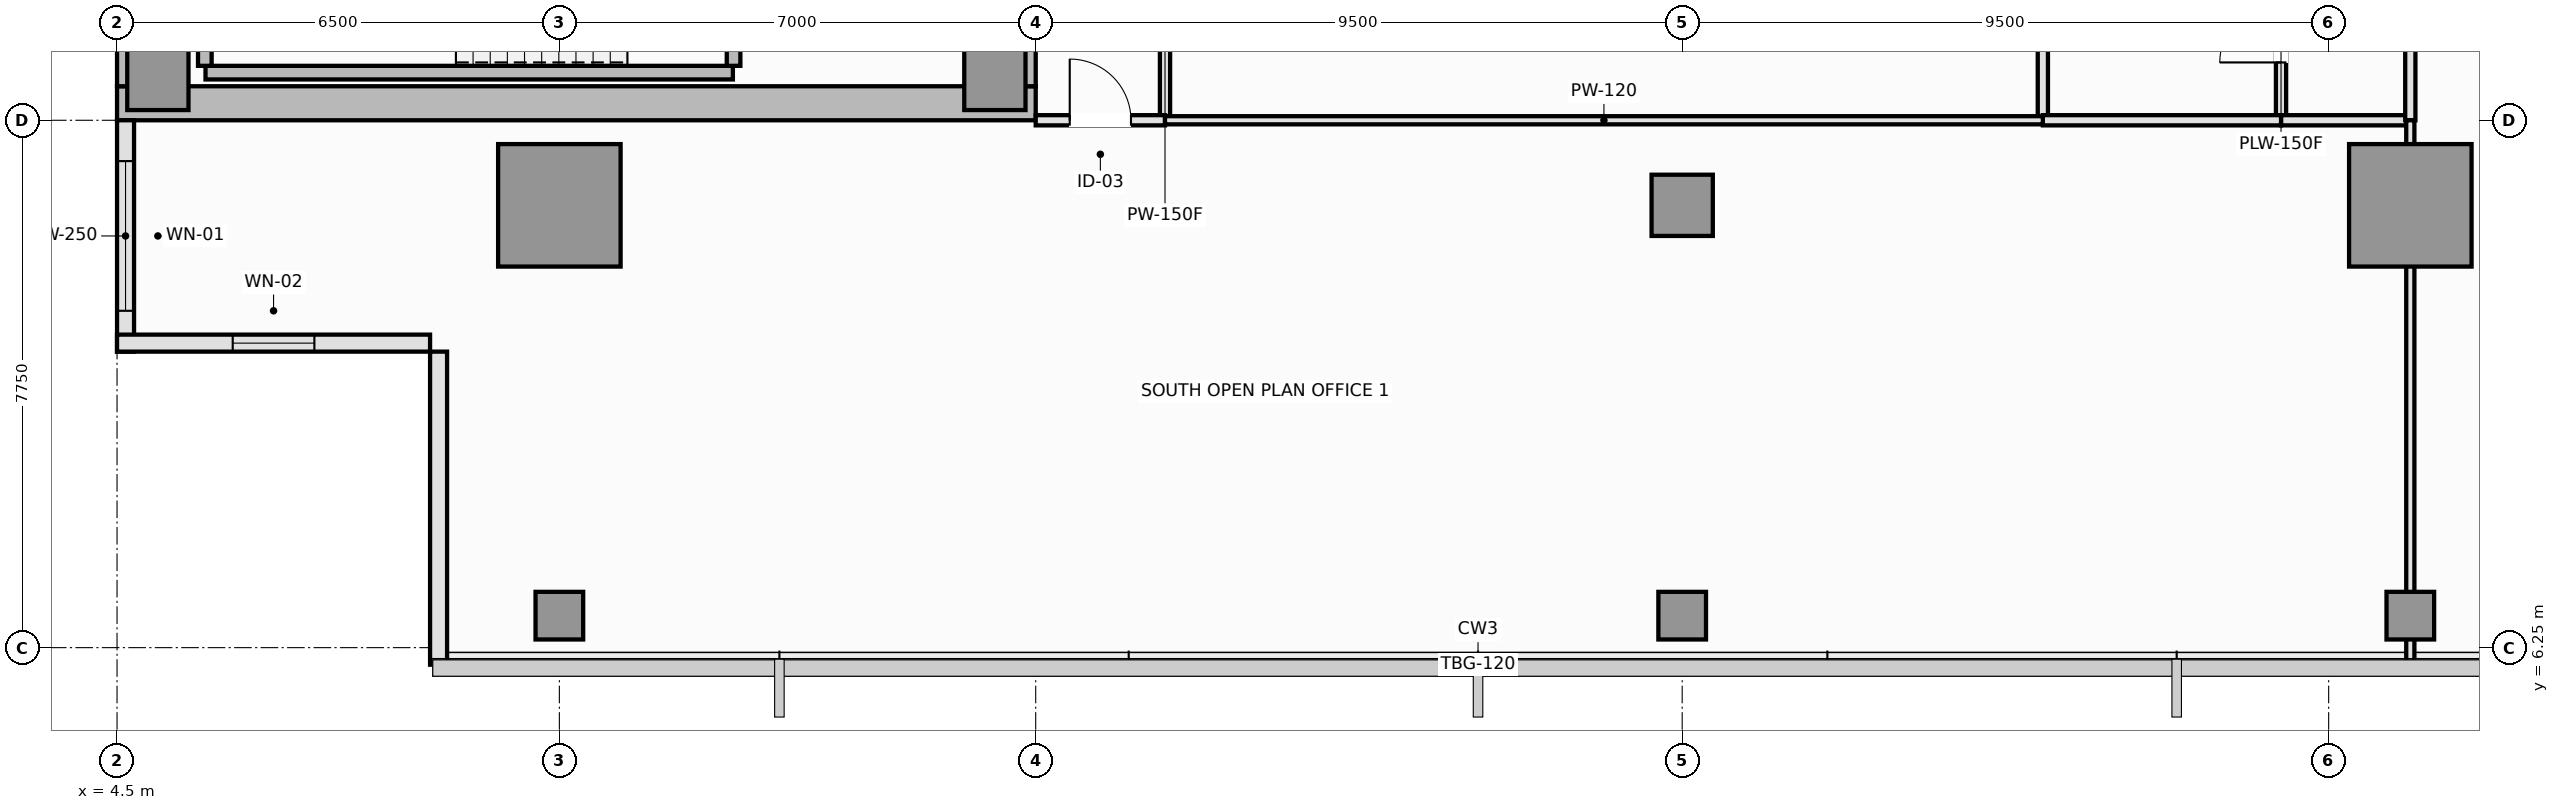
"""IFC4 building model, lengths in metres.
Left out: names, types, materials, properties, quantities, classifications, styles, units other than length and angle.
Written with IfcOpenShell. Run it as: python <this file> out.ifc"""

import sys

from ifc_helpers import new_model, si_unit, direction, frame, frame_2d, origin, origin_2d, place, context, subcontext, project, spatial, rectangle, extrude, element, fill, save


model = new_model("IFC4")
c1 = context("Model", 3, precision=1e-05, world=origin(), true_north=direction((0.0, 1.0)))
c2 = subcontext(c1, "Body", "Model", "MODEL_VIEW")
j1 = project(units=[si_unit("LENGTHUNIT", "METRE"), si_unit("PLANEANGLEUNIT", "RADIAN")], contexts=[c1])
p1 = place(None, origin())
s1 = spatial("IfcSite", under=j1, at=p1, CompositionType="ELEMENT")
p2 = place(p1, origin())
s2 = spatial("IfcBuilding", under=s1, at=p2, CompositionType="ELEMENT")
p3 = place(p2, frame((0.0, 0.0, 249.25)))
s3 = spatial("IfcBuildingStorey", under=s2, at=p3, CompositionType="ELEMENT", Elevation=249.25)
p4 = place(p3, frame((4.5, 14.25, 0.0), z_axis=(0.0, 0.0, 1.0), x_axis=(1.0, 0.0, 0.0)))
e1 = element("IfcWall", 1, at=p4, inside=s3, PredefinedType="SHEAR", context=c2, shape_type="SweptSolid", body=[
    extrude(rectangle(XDim=13.5, YDim=0.5, at=frame_2d((6.75, 0.0))), origin(), (0.0, 0.0, 1.0), 3.55),
])
p5 = place(p3, frame((4.75, 14.5, 0.0), z_axis=(0.0, 0.0, 1.0), x_axis=(0.0, 1.0, 0.0)))
e2 = element("IfcWall", 2, at=p5, inside=s3, PredefinedType="SHEAR", context=c2, shape_type="SweptSolid", body=[
    extrude(rectangle(XDim=21.5, YDim=0.5, at=frame_2d((10.75, 0.0))), origin(), (0.0, 0.0, 1.0), 3.55),
])
p6 = place(p3, frame((17.75, 14.5, 0.0), z_axis=(0.0, 0.0, 1.0), x_axis=(0.0, 1.0, 0.0)))
e3 = element("IfcWall", 3, at=p6, inside=s3, PredefinedType="SHEAR", context=c2, shape_type="SweptSolid", body=[
    extrude(rectangle(XDim=8.95, YDim=0.5, at=frame_2d((4.475, 0.0))), origin(), (0.0, 0.0, 1.0), 3.55),
])
p7 = place(p6, frame((4.4, 0.0, 0.0)))
e4 = element("IfcOpeningElement", 4, at=p7, cuts=e3, PredefinedType="OPENING", context=c2, shape_type="SweptSolid", body=[
    extrude(rectangle(XDim=1.1, YDim=2.15, at=frame_2d((0.55, 1.075))), frame((0.0, 0.26, 0.0), z_axis=(0.0, -1.0, 0.0), x_axis=(1.0, 0.0, 0.0)), (0.0, 0.0, 1.0), 0.52),
])
for number, where, z_axis, x_axis in (
    (5, (5.1, 14.6, 0.0), (0.0, 0.0, 1.0), (1.0, 0.0, 0.0)),
    (6, (17.4, 14.6, 0.0), (0.0, 0.0, 1.0), (1.0, 0.0, 0.0)),
):
    element("IfcColumn", number, at=place(p3, frame(where, z_axis=z_axis, x_axis=x_axis)), inside=s3, PredefinedType="PILASTER", context=c2, shape_type="SweptSolid", body=[
        extrude(rectangle(XDim=0.9, YDim=0.9, at=origin_2d()), origin(), (0.0, 0.0, 1.0), 3.55),
    ])
for number, where, z_axis, x_axis in (
    (7, (11.0, 12.75, 0.0), (0.0, 0.0, 1.0), (1.0, 0.0, 0.0)),
    (8, (38.2, 12.75, 0.0), (0.0, 0.0, 1.0), (1.0, 0.0, 0.0)),
):
    element("IfcColumn", number, at=place(p3, frame(where, z_axis=z_axis, x_axis=x_axis)), inside=s3, PredefinedType="COLUMN", context=c2, shape_type="SweptSolid", body=[
        extrude(rectangle(XDim=1.8, YDim=1.8, at=origin_2d()), origin(), (0.0, 0.0, 1.0), 3.55),
    ])
p8 = place(p3, frame((27.5, 12.75, 0.0), z_axis=(0.0, 0.0, 1.0), x_axis=(1.0, 0.0, 0.0)))
e9 = element("IfcColumn", 9, at=p8, inside=s3, PredefinedType="COLUMN", context=c2, shape_type="SweptSolid", body=[
    extrude(rectangle(XDim=0.9, YDim=0.9, at=origin_2d()), origin(), (0.0, 0.0, 1.0), 3.55),
])
for number, where, z_axis, x_axis in (
    (10, (11.0, 6.72, 0.0), (0.0, 0.0, 1.0), (1.0, 0.0, 0.0)),
    (11, (27.5, 6.72, 0.0), (0.0, 0.0, 1.0), (1.0, 0.0, 0.0)),
    (12, (38.2, 6.72, 0.0), (0.0, 0.0, 1.0), (1.0, 0.0, 0.0)),
):
    element("IfcColumn", number, at=place(p3, frame(where, z_axis=z_axis, x_axis=x_axis)), inside=s3, PredefinedType="COLUMN", context=c2, shape_type="SweptSolid", body=[
        extrude(rectangle(XDim=0.7, YDim=0.7, at=origin_2d()), origin(), (0.0, 0.0, 1.0), 3.55),
    ])
p9 = place(p3, frame((4.625, 14.0, 0.0), z_axis=(0.0, 0.0, 1.0), x_axis=(0.0, -1.0, 0.0)))
e13 = element("IfcWall", 13, at=p9, inside=s3, PredefinedType="SOLIDWALL", context=c2, shape_type="SweptSolid", body=[
    extrude(rectangle(XDim=3.4, YDim=0.25, at=frame_2d((1.7, 0.0))), origin(), (0.0, 0.0, 1.0), 3.39),
])
p10 = place(p9, frame((0.6, 0.0, 0.9)))
e14 = element("IfcOpeningElement", 14, at=p10, cuts=e13, PredefinedType="OPENING", context=c2, shape_type="SweptSolid", body=[
    extrude(rectangle(XDim=2.2, YDim=1.8, at=frame_2d((1.1, 0.9))), frame((0.0, 0.135, 0.0), z_axis=(0.0, -1.0, 0.0), x_axis=(1.0, 0.0, 0.0)), (0.0, 0.0, 1.0), 0.27),
])
p11 = place(p3, frame((4.5, 10.725, 0.0), z_axis=(0.0, 0.0, 1.0), x_axis=(1.0, 0.0, 0.0)))
e15 = element("IfcWall", 15, at=p11, inside=s3, PredefinedType="SOLIDWALL", context=c2, shape_type="SweptSolid", body=[
    extrude(rectangle(XDim=4.6, YDim=0.25, at=frame_2d((2.3, 0.0))), origin(), (0.0, 0.0, 1.0), 3.39),
])
p12 = place(p11, frame((1.7, 0.0, 0.9)))
e16 = element("IfcOpeningElement", 16, at=p12, cuts=e15, PredefinedType="OPENING", context=c2, shape_type="SweptSolid", body=[
    extrude(rectangle(XDim=1.2, YDim=1.8, at=frame_2d((0.6, 0.9))), frame((0.0, 0.135, 0.0), z_axis=(0.0, -1.0, 0.0), x_axis=(1.0, 0.0, 0.0)), (0.0, 0.0, 1.0), 0.27),
])
p13 = place(p3, frame((9.225, 10.6, 0.0), z_axis=(0.0, 0.0, 1.0), x_axis=(0.0, -1.0, 0.0)))
e17 = element("IfcWall", 17, at=p13, inside=s3, PredefinedType="SOLIDWALL", context=c2, shape_type="SweptSolid", body=[
    extrude(rectangle(XDim=4.6, YDim=0.25, at=frame_2d((2.3, 0.0))), origin(), (0.0, 0.0, 1.0), 3.39),
])
p14 = place(p3, frame((5.8, 14.7, 0.0), z_axis=(0.0, 0.0, 1.0), x_axis=(1.0, 0.0, 0.0)))
e18 = element("IfcWall", 18, at=p14, inside=s3, PredefinedType="SOLIDWALL", context=c2, shape_type="SweptSolid", body=[
    extrude(rectangle(XDim=7.75, YDim=0.2, at=frame_2d((3.875, 0.0))), origin(), (0.0, 0.0, 1.0), 3.55),
])
p15 = place(p3, frame((5.79, 14.8, 0.0), z_axis=(0.0, 0.0, 1.0), x_axis=(0.0, 1.0, 0.0)))
e19 = element("IfcWall", 19, at=p15, inside=s3, PredefinedType="SOLIDWALL", context=c2, shape_type="SweptSolid", body=[
    extrude(rectangle(XDim=3.05, YDim=0.2, at=frame_2d((1.525, 0.0))), origin(), (0.0, 0.0, 1.0), 3.55),
])
p16 = place(p3, frame((13.56, 14.8, 0.0), z_axis=(0.0, 0.0, 1.0), x_axis=(0.0, 1.0, 0.0)))
e20 = element("IfcWall", 20, at=p16, inside=s3, PredefinedType="SOLIDWALL", context=c2, shape_type="SweptSolid", body=[
    extrude(rectangle(XDim=3.05, YDim=0.2, at=frame_2d((1.525, 0.0))), origin(), (0.0, 0.0, 1.0), 3.55),
])
p17 = place(p16, frame((0.95, 0.0, 0.0)))
e21 = element("IfcOpeningElement", 21, at=p17, cuts=e20, PredefinedType="OPENING", context=c2, shape_type="SweptSolid", body=[
    extrude(rectangle(XDim=1.15, YDim=2.15, at=frame_2d((0.575, 1.075))), frame((0.0, 0.11, 0.0), z_axis=(0.0, -1.0, 0.0), x_axis=(1.0, 0.0, 0.0)), (0.0, 0.0, 1.0), 0.22),
])
p18 = place(p3, frame((19.9, 14.0, 0.0), z_axis=(0.0, 0.0, 1.0), x_axis=(0.0, 1.0, 0.0)))
e22 = element("IfcWall", 22, at=p18, inside=s3, PredefinedType="PARTITIONING", context=c2, shape_type="SweptSolid", body=[
    extrude(rectangle(XDim=3.2, YDim=0.15, at=frame_2d((1.6, 0.0))), origin(), (0.0, 0.0, 1.0), 3.39),
])
p19 = place(p18, frame((1.1, 0.0, 0.0)))
e23 = element("IfcOpeningElement", 23, at=p19, cuts=e22, PredefinedType="OPENING", context=c2, shape_type="SweptSolid", body=[
    extrude(rectangle(XDim=1.0, YDim=2.15, at=frame_2d((0.5, 1.075))), frame((0.0, 0.085, 0.0), z_axis=(0.0, -1.0, 0.0), x_axis=(1.0, 0.0, 0.0)), (0.0, 0.0, 1.0), 0.17),
])
p20 = place(p3, frame((18.0, 14.0, 0.0), z_axis=(0.0, 0.0, 1.0), x_axis=(1.0, 0.0, 0.0)))
e24 = element("IfcWall", 24, at=p20, inside=s3, PredefinedType="PARTITIONING", context=c2, shape_type="SweptSolid", body=[
    extrude(rectangle(XDim=1.9, YDim=0.15, at=frame_2d((0.95, 0.0))), origin(), (0.0, 0.0, 1.0), 3.39),
])
p21 = place(p20, frame((0.5, 0.0, 0.0)))
e25 = element("IfcOpeningElement", 25, at=p21, cuts=e24, PredefinedType="OPENING", context=c2, shape_type="SweptSolid", body=[
    extrude(rectangle(XDim=0.9, YDim=2.1, at=frame_2d((0.45, 1.05))), frame((0.0, 0.085, 0.0), z_axis=(0.0, -1.0, 0.0), x_axis=(1.0, 0.0, 0.0)), (0.0, 0.0, 1.0), 0.17),
])
p22 = place(p3, frame((36.3, 14.0, 0.0), z_axis=(0.0, 0.0, 1.0), x_axis=(0.0, 1.0, 0.0)))
e26 = element("IfcWall", 26, at=p22, inside=s3, PredefinedType="PLUMBINGWALL", context=c2, shape_type="SweptSolid", body=[
    extrude(rectangle(XDim=2.6, YDim=0.15, at=frame_2d((1.3, 0.0))), origin(), (0.0, 0.0, 1.0), 3.39),
])
p23 = place(p22, frame((0.85, 0.0, 0.0)))
e27 = element("IfcOpeningElement", 27, at=p23, cuts=e26, PredefinedType="OPENING", context=c2, shape_type="SweptSolid", body=[
    extrude(rectangle(XDim=0.9, YDim=2.1, at=frame_2d((0.45, 1.05))), frame((0.0, 0.085, 0.0), z_axis=(0.0, -1.0, 0.0), x_axis=(1.0, 0.0, 0.0)), (0.0, 0.0, 1.0), 0.17),
])
p24 = place(p3, frame((36.3, 14.0, 0.0), z_axis=(0.0, 0.0, 1.0), x_axis=(1.0, 0.0, 0.0)))
e28 = element("IfcWall", 28, at=p24, inside=s3, PredefinedType="PARTITIONING", context=c2, shape_type="SweptSolid", body=[
    extrude(rectangle(XDim=1.9, YDim=0.15, at=frame_2d((0.95, 0.0))), origin(), (0.0, 0.0, 1.0), 3.39),
])
p25 = place(p3, frame((38.2, 14.0, 0.0), z_axis=(0.0, 0.0, 1.0), x_axis=(0.0, 1.0, 0.0)))
e29 = element("IfcWall", 29, at=p25, inside=s3, PredefinedType="PARTITIONING", context=c2, shape_type="SweptSolid", body=[
    extrude(rectangle(XDim=7.6, YDim=0.15, at=frame_2d((3.8, 0.0))), origin(), (0.0, 0.0, 1.0), 2.99),
])
p26 = place(p25, frame((2.706, 0.0, 0.0)))
e30 = element("IfcOpeningElement", 30, at=p26, cuts=e29, PredefinedType="OPENING", context=c2, shape_type="SweptSolid", body=[
    extrude(rectangle(XDim=1.0, YDim=2.15, at=frame_2d((0.5, 1.075))), frame((0.0, 0.085, 0.0), z_axis=(0.0, -1.0, 0.0), x_axis=(1.0, 0.0, 0.0)), (0.0, 0.0, 1.0), 0.17),
])
p27 = place(p3, frame((32.8, 14.0, 0.0), z_axis=(0.0, 0.0, 1.0), x_axis=(0.0, 1.0, 0.0)))
e31 = element("IfcWall", 31, at=p27, inside=s3, PredefinedType="PLUMBINGWALL", context=c2, shape_type="SweptSolid", body=[
    extrude(rectangle(XDim=2.6, YDim=0.15, at=frame_2d((1.3, 0.0))), origin(), (0.0, 0.0, 1.0), 3.39),
])
p28 = place(p3, frame((32.8, 14.0, 0.0), z_axis=(0.0, 0.0, 1.0), x_axis=(1.0, 0.0, 0.0)))
e32 = element("IfcWall", 32, at=p28, inside=s3, PredefinedType="PLUMBINGWALL", context=c2, shape_type="SweptSolid", body=[
    extrude(rectangle(XDim=3.5, YDim=0.15, at=frame_2d((1.75, 0.0))), origin(), (0.0, 0.0, 1.0), 3.39),
])
p29 = place(p3, frame((19.9, 14.0, 0.0), z_axis=(0.0, 0.0, 1.0), x_axis=(1.0, 0.0, 0.0)))
e33 = element("IfcWall", 33, at=p29, inside=s3, PredefinedType="PARTITIONING", context=c2, shape_type="SweptSolid", body=[
    extrude(rectangle(XDim=12.9, YDim=0.12, at=frame_2d((6.45, 0.0))), origin(), (0.0, 0.0, 1.0), 3.39),
])
p30 = place(p3, frame((38.2, 6.01, 0.0), z_axis=(0.0, 0.0, 1.0), x_axis=(0.0, 1.0, 0.0)))
e34 = element("IfcWall", 34, at=p30, inside=s3, PredefinedType="PARTITIONING", context=c2, shape_type="SweptSolid", body=[
    extrude(rectangle(XDim=7.99, YDim=0.12, at=frame_2d((3.995, 0.0))), origin(), (0.0, 0.0, 1.0), 2.99),
])
p31 = place(p10, origin())
e35 = element("IfcWindow", 35, at=p31, inside=s3, PartitioningType="SINGLE_PANEL", PredefinedType="WINDOW", context=c2, shape_type="SweptSolid", body=[
    extrude(rectangle(XDim=2.2, YDim=1.8, at=frame_2d((1.1, 0.9))), frame((0.0, 0.03, 0.0), z_axis=(0.0, -1.0, 0.0), x_axis=(1.0, 0.0, 0.0)), (0.0, 0.0, 1.0), 0.06),
])
fill(e14, e35)
p32 = place(p12, origin())
e36 = element("IfcWindow", 36, at=p32, inside=s3, PartitioningType="SINGLE_PANEL", PredefinedType="WINDOW", context=c2, shape_type="SweptSolid", body=[
    extrude(rectangle(XDim=1.2, YDim=1.8, at=frame_2d((0.6, 0.9))), frame((0.0, 0.03, 0.0), z_axis=(0.0, -1.0, 0.0), x_axis=(1.0, 0.0, 0.0)), (0.0, 0.0, 1.0), 0.06),
])
fill(e16, e36)
p33 = place(p21, origin())
e37 = element("IfcDoor", 37, at=p33, inside=s3, OperationType="SINGLE_SWING_LEFT", PredefinedType="DOOR", context=c2, shape_type="SweptSolid", body=[
    extrude(rectangle(XDim=0.9, YDim=2.1, at=frame_2d((0.45, 1.05))), frame((0.0, 0.025, 0.0), z_axis=(0.0, -1.0, 0.0), x_axis=(1.0, 0.0, 0.0)), (0.0, 0.0, 1.0), 0.05),
])
fill(e25, e37)
p34 = place(p23, origin())
e38 = element("IfcDoor", 38, at=p34, inside=s3, OperationType="SINGLE_SWING_LEFT", PredefinedType="DOOR", context=c2, shape_type="SweptSolid", body=[
    extrude(rectangle(XDim=0.9, YDim=2.1, at=frame_2d((0.45, 1.05))), frame((0.0, 0.025, 0.0), z_axis=(0.0, -1.0, 0.0), x_axis=(1.0, 0.0, 0.0)), (0.0, 0.0, 1.0), 0.05),
])
fill(e27, e38)
save(model, sys.argv[1])
